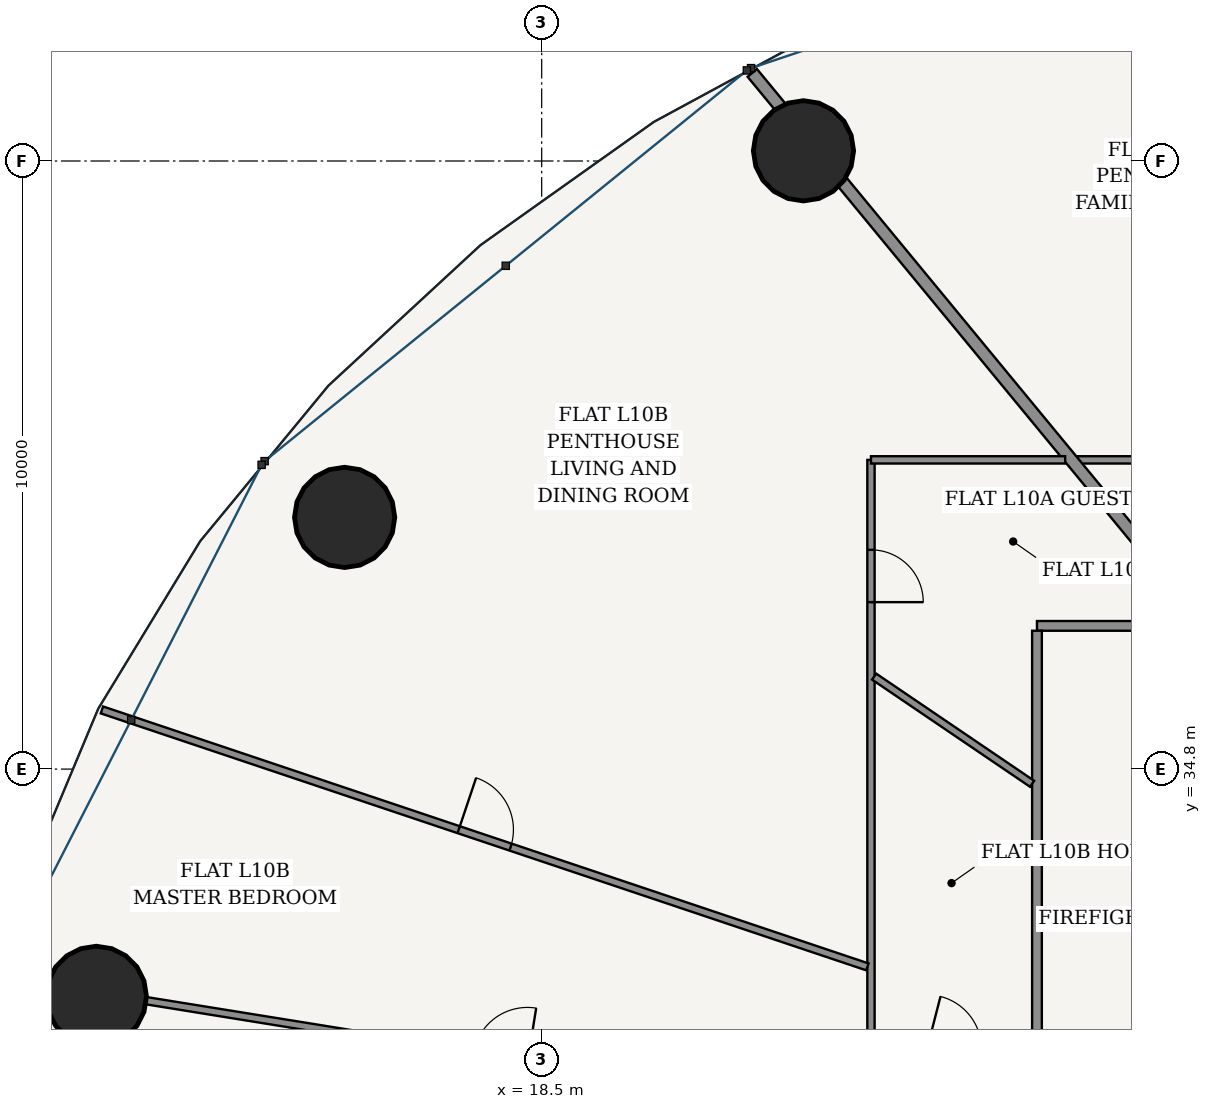
"""IFC4 building model, lengths in metres.
Left out: names, types, materials, properties, quantities, classifications, styles, units other than length and angle.
Written with IfcOpenShell. Run it as: python <this file> out.ifc"""

import sys

from ifc_helpers import new_model, si_unit, direction, frame, frame_2d, origin, origin_2d, place, context, subcontext, project, spatial, rectangle, hollow_circle, extrude, source, transform, mapped, element, fill, save


model = new_model("IFC4")
c1 = context("Model", 3, precision=1e-05, world=origin(), true_north=direction((-0.2419218956, 0.970295726276)))
c2 = subcontext(c1, "Body", "Model", "MODEL_VIEW")
j1 = project(units=[si_unit("LENGTHUNIT", "METRE"), si_unit("PLANEANGLEUNIT", "RADIAN")], contexts=[c1])
p1 = place(None, origin())
s1 = spatial("IfcSite", under=j1, at=p1, CompositionType="ELEMENT")
p2 = place(p1, origin())
s2 = spatial("IfcBuilding", under=s1, at=p2, CompositionType="ELEMENT")
p3 = place(p2, frame((0.0, 0.0, 42.0)))
s3 = spatial("IfcBuildingStorey", under=s2, at=p3, CompositionType="ELEMENT", Elevation=42.0)
for number, where, z_axis, x_axis in (
    (1, (22.805, 44.968, 0.0), (0.0, 0.0, 1.0), (1.0, 0.0, 0.0)),
    (2, (15.259, 38.939, 0.0), (0.0, 0.0, 1.0), (1.0, 0.0, 0.0)),
    (3, (11.176, 31.063, 0.0), (0.0, 0.0, 1.0), (1.0, 0.0, 0.0)),
):
    element("IfcColumn", number, at=place(p3, frame(where, z_axis=z_axis, x_axis=x_axis)), inside=s3, PredefinedType="COLUMN", context=c2, shape_type="SweptSolid", body=[
        extrude(hollow_circle(Radius=0.825, WallThickness=0.05, at=origin_2d()), origin(), (0.0, 0.0, 1.0), 3.6),
    ])
p4 = place(p3, frame((26.645, 37.155, 0.0), z_axis=(0.0, 0.0, 1.0), x_axis=(1.0, 0.0, 0.0)))
e4 = element("IfcWall", 4, at=p4, inside=s3, PredefinedType="PARTITIONING", context=c2, shape_type="SweptSolid", body=[
    extrude(rectangle(XDim=22.71, YDim=0.16, at=frame_2d((11.355, 0.0))), origin(), (0.0, 0.0, 1.0), 2.688),
])
p5 = place(p3, frame((26.645, 16.525, 0.0), z_axis=(0.0, 0.0, 1.0), x_axis=(0.0, 1.0, 0.0)))
e5 = element("IfcWall", 5, at=p5, inside=s3, PredefinedType="PARTITIONING", context=c2, shape_type="SweptSolid", body=[
    extrude(rectangle(XDim=20.55, YDim=0.16, at=frame_2d((10.275, 0.0))), origin(), (0.0, 0.0, 1.0), 2.688),
])
p6 = place(p5, frame((1.226, 0.0, 0.0)))
e6 = element("IfcOpeningElement", 6, at=p6, cuts=e5, PredefinedType="OPENING", context=c2, shape_type="SweptSolid", body=[
    extrude(rectangle(XDim=0.98, YDim=2.2, at=frame_2d((0.49, 1.1))), frame((0.0, 0.09, 0.0), z_axis=(0.0, -1.0, 0.0), x_axis=(1.0, 0.0, 0.0)), (0.0, 0.0, 1.0), 0.18),
])
p7 = place(p3, frame((27.312, 39.885, 0.0), z_axis=(0.0, 0.0, 1.0), x_axis=(1.0, 0.0, 0.0)))
e7 = element("IfcWall", 7, at=p7, inside=s3, PredefinedType="PARTITIONING", context=c2, shape_type="SweptSolid", body=[
    extrude(rectangle(XDim=24.772, YDim=0.12, at=frame_2d((12.386, 0.0))), origin(), (0.0, 0.0, 1.0), 2.688),
])
p8 = place(p3, frame((29.395, 37.237, 0.0), z_axis=(0.0, 0.0, 1.0), x_axis=(-0.636195770442, 0.77152766747, 0.0)))
e8 = element("IfcWall", 8, at=p8, inside=s3, PredefinedType="PARTITIONING", context=c2, shape_type="SweptSolid", body=[
    extrude(rectangle(XDim=11.681, YDim=0.2, at=frame_2d((5.84, 0.0))), origin(), (0.0, 0.0, 1.0), 2.688),
])
p9 = place(p3, frame((23.915, 13.715, 0.0), z_axis=(0.0, 0.0, 1.0), x_axis=(0.0, 1.0, 0.0)))
e9 = element("IfcWall", 9, at=p9, inside=s3, PredefinedType="PARTITIONING", context=c2, shape_type="SweptSolid", body=[
    extrude(rectangle(XDim=26.17, YDim=0.12, at=frame_2d((13.085, 0.0))), origin(), (0.0, 0.0, 1.0), 2.688),
])
p10 = place(p9, frame((1.895, 0.0, 0.0)))
e10 = element("IfcOpeningElement", 10, at=p10, cuts=e9, PredefinedType="OPENING", context=c2, shape_type="SweptSolid", body=[
    extrude(rectangle(XDim=0.9, YDim=2.15, at=frame_2d((0.45, 1.075))), frame((0.0, 0.07, 0.0), z_axis=(0.0, -1.0, 0.0), x_axis=(1.0, 0.0, 0.0)), (0.0, 0.0, 1.0), 0.14),
])
p11 = place(p9, frame((11.498, 0.0, 0.0)))
e11 = element("IfcOpeningElement", 11, at=p11, cuts=e9, PredefinedType="OPENING", context=c2, shape_type="SweptSolid", body=[
    extrude(rectangle(XDim=0.9, YDim=2.15, at=frame_2d((0.45, 1.075))), frame((0.0, 0.07, 0.0), z_axis=(0.0, -1.0, 0.0), x_axis=(1.0, 0.0, 0.0)), (0.0, 0.0, 1.0), 0.14),
])
p12 = place(p9, frame((23.831, 0.0, 0.0)))
e12 = element("IfcOpeningElement", 12, at=p12, cuts=e9, PredefinedType="OPENING", context=c2, shape_type="SweptSolid", body=[
    extrude(rectangle(XDim=0.86, YDim=2.15, at=frame_2d((0.43, 1.075))), frame((0.0, 0.07, 0.0), z_axis=(0.0, -1.0, 0.0), x_axis=(1.0, 0.0, 0.0)), (0.0, 0.0, 1.0), 0.14),
])
p13 = place(p3, frame((23.915, 39.885, 0.0), z_axis=(0.0, 0.0, 1.0), x_axis=(1.0, 0.0, 0.0)))
e13 = element("IfcWall", 13, at=p13, inside=s3, PredefinedType="PARTITIONING", context=c2, shape_type="SweptSolid", body=[
    extrude(rectangle(XDim=3.194, YDim=0.12, at=frame_2d((1.597, 0.0))), origin(), (0.0, 0.0, 1.0), 2.688),
])
p14 = place(p3, frame((23.856, 31.547, 0.0), z_axis=(0.0, 0.0, 1.0), x_axis=(-0.948017487737, 0.318218231634, 0.0)))
e14 = element("IfcWall", 14, at=p14, inside=s3, PredefinedType="PARTITIONING", context=c2, shape_type="SweptSolid", body=[
    extrude(rectangle(XDim=13.279, YDim=0.12, at=frame_2d((6.639, 0.0))), origin(), (0.0, 0.0, 1.0), 2.762),
])
p15 = place(p14, frame((6.189, 0.0, 0.0)))
e15 = element("IfcOpeningElement", 15, at=p15, cuts=e14, PredefinedType="OPENING", context=c2, shape_type="SweptSolid", body=[
    extrude(rectangle(XDim=0.9, YDim=2.15, at=frame_2d((0.45, 1.075))), frame((0.0, 0.07, 0.0), z_axis=(0.0, -1.0, 0.0), x_axis=(1.0, 0.0, 0.0)), (0.0, 0.0, 1.0), 0.14),
])
p16 = place(p3, frame((23.854, 29.08, 0.0), z_axis=(0.0, 0.0, 1.0), x_axis=(-0.987255773689, 0.159141563768, 0.0)))
e16 = element("IfcWall", 16, at=p16, inside=s3, PredefinedType="PARTITIONING", context=c2, shape_type="SweptSolid", body=[
    extrude(rectangle(XDim=14.359, YDim=0.12, at=frame_2d((7.18, 0.0))), origin(), (0.0, 0.0, 1.0), 2.688),
])
p17 = place(p16, frame((5.66, 0.0, 0.0)))
e17 = element("IfcOpeningElement", 17, at=p17, cuts=e16, PredefinedType="OPENING", context=c2, shape_type="SweptSolid", body=[
    extrude(rectangle(XDim=0.9, YDim=2.15, at=frame_2d((0.45, 1.075))), frame((0.0, 0.07, 0.0), z_axis=(0.0, -1.0, 0.0), x_axis=(1.0, 0.0, 0.0)), (0.0, 0.0, 1.0), 0.14),
])
p18 = place(p3, frame((26.565, 34.558, 0.0), z_axis=(0.0, 0.0, 1.0), x_axis=(-0.827501574847, 0.561463394734, 0.0)))
e18 = element("IfcWall", 18, at=p18, inside=s3, PredefinedType="PARTITIONING", context=c2, shape_type="SweptSolid", body=[
    extrude(rectangle(XDim=3.14, YDim=0.12, at=frame_2d((1.57, 0.0))), origin(), (0.0, 0.0, 1.0), 3.32),
])
m1 = source(origin(), c2, "Body", "SweptSolid", [
    extrude(rectangle(XDim=0.9, YDim=2.15, at=frame_2d((0.45, 1.075))), frame((0.0, 0.025, 0.0), z_axis=(0.0, -1.0, 0.0), x_axis=(1.0, 0.0, 0.0)), (0.0, 0.0, 1.0), 0.05),
])
p19 = place(p15, frame((0.9, 0.0, 0.0), z_axis=(0.0, 0.0, 1.0), x_axis=(-1.0, 0.0, 0.0)))
e19 = element("IfcDoor", 19, at=p19, inside=s3, OperationType="SINGLE_SWING_LEFT", PredefinedType="DOOR", context=c2, shape_type="MappedRepresentation", body=[
    mapped(m1, transform((0.0, 0.0, 0.0), scale=1.0)),
])
fill(e15, e19)
m2 = source(origin(), c2, "Body", "SweptSolid", [
    extrude(rectangle(XDim=0.86, YDim=2.15, at=frame_2d((0.43, 1.075))), frame((0.0, 0.025, 0.0), z_axis=(0.0, -1.0, 0.0), x_axis=(1.0, 0.0, 0.0)), (0.0, 0.0, 1.0), 0.05),
])
p20 = place(p12, frame((0.86, 0.0, 0.0), z_axis=(0.0, 0.0, 1.0), x_axis=(-1.0, 0.0, 0.0)))
e20 = element("IfcDoor", 20, at=p20, inside=s3, OperationType="SINGLE_SWING_RIGHT", PredefinedType="DOOR", context=c2, shape_type="MappedRepresentation", body=[
    mapped(m2, transform((0.0, 0.0, 0.0), scale=1.0)),
])
fill(e12, e20)
save(model, sys.argv[1])
